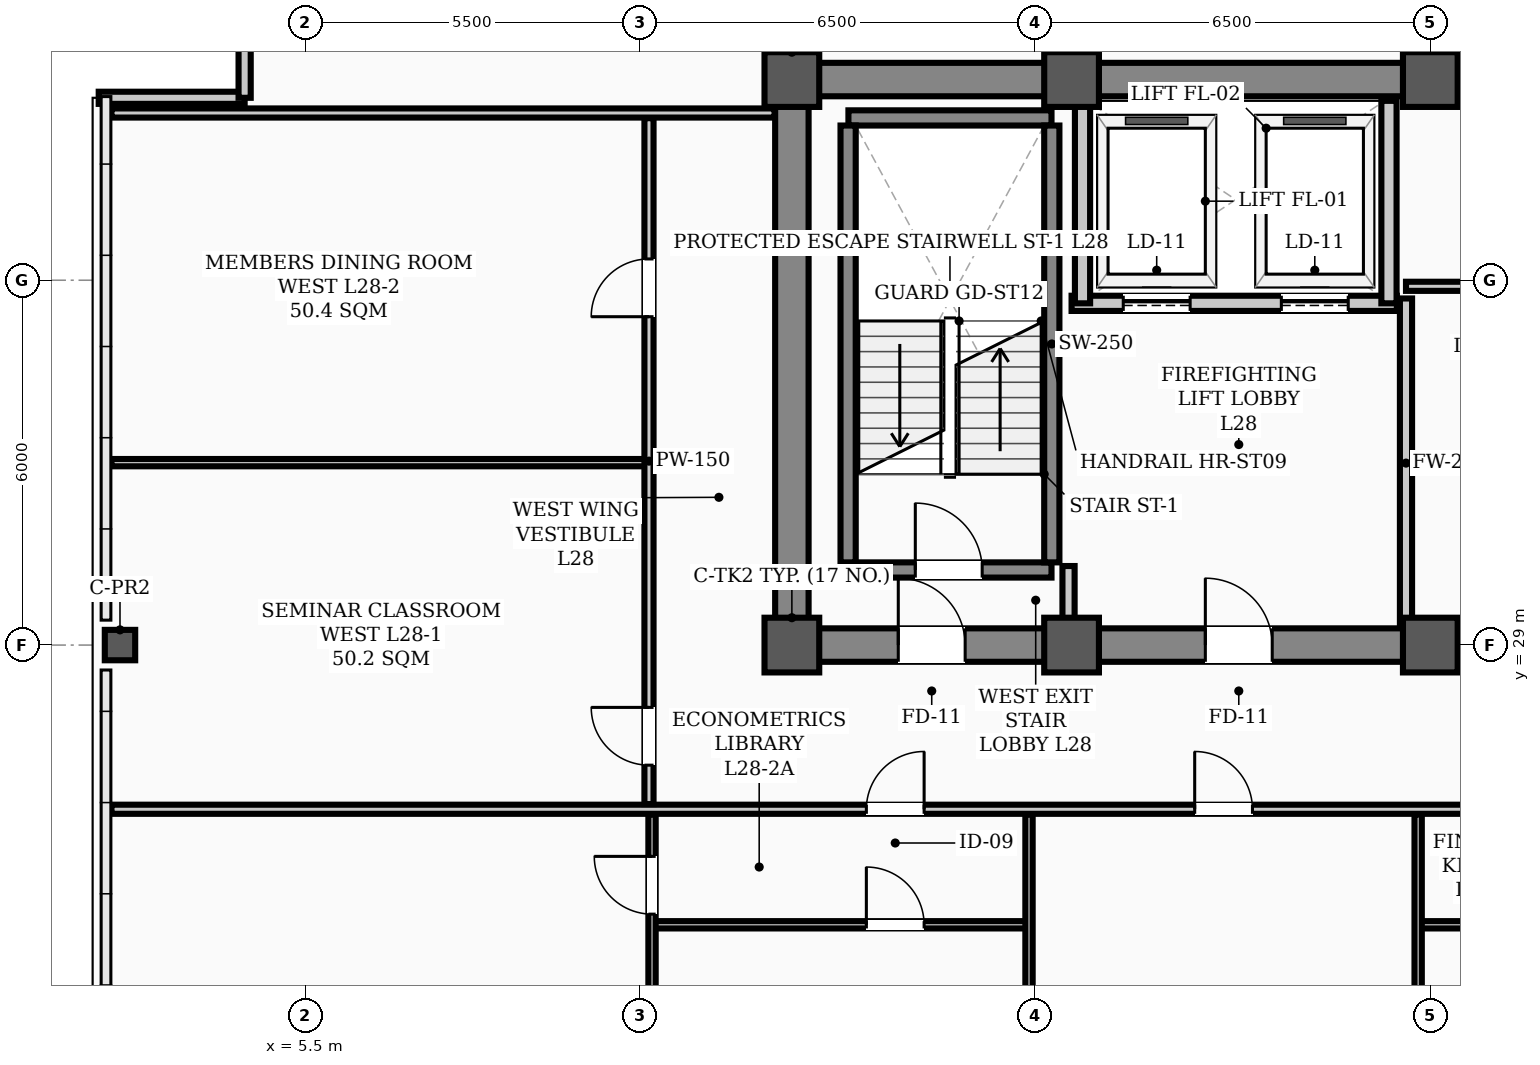
"""IFC4 building model, lengths in metres.
Left out: names, types, materials, properties, quantities, classifications, styles, units other than length and angle.
Written with IfcOpenShell. Run it as: python <this file> out.ifc"""

import sys

from ifc_helpers import new_model, si_unit, direction, frame, frame_2d, origin, origin_2d, place, context, subcontext, project, spatial, rectangle, hollow_rectangle, extrude, element, fill, save


model = new_model("IFC4")
c1 = context("Model", 3, precision=1e-05, world=origin(), true_north=direction((0.0, 1.0)))
c2 = subcontext(c1, "Body", "Model", "MODEL_VIEW")
j1 = project(units=[si_unit("LENGTHUNIT", "METRE"), si_unit("PLANEANGLEUNIT", "RADIAN")], contexts=[c1])
p1 = place(None, origin())
s1 = spatial("IfcSite", under=j1, at=p1, CompositionType="ELEMENT")
p2 = place(p1, origin())
s2 = spatial("IfcBuilding", under=s1, at=p2, CompositionType="ELEMENT")
p3 = place(p2, frame((0.0, 0.0, 114.9)))
s3 = spatial("IfcBuildingStorey", under=s2, at=p3, CompositionType="ELEMENT", Elevation=114.9)
for number, where, z_axis, x_axis in (
    (1, (13.5, 29.0, 0.0), (0.0, 0.0, 1.0), (1.0, 0.0, 0.0)),
    (2, (13.5, 38.3, 0.0), (0.0, 0.0, 1.0), (1.0, 0.0, 0.0)),
    (3, (18.1, 29.0, 0.0), (0.0, 0.0, 1.0), (1.0, 0.0, 0.0)),
    (4, (18.1, 38.3, 0.0), (0.0, 0.0, 1.0), (1.0, 0.0, 0.0)),
    (5, (24.0, 29.0, 0.0), (0.0, 0.0, 1.0), (1.0, 0.0, 0.0)),
    (6, (24.0, 38.3, 0.0), (0.0, 0.0, 1.0), (1.0, 0.0, 0.0)),
):
    element("IfcColumn", number, at=place(p3, frame(where, z_axis=z_axis, x_axis=x_axis)), inside=s3, PredefinedType="COLUMN", context=c2, shape_type="SweptSolid", body=[
        extrude(hollow_rectangle(XDim=0.9, YDim=0.9, WallThickness=0.035, InnerFilletRadius=0.017, OuterFilletRadius=0.052, at=origin_2d()), origin(), (0.0, 0.0, 1.0), 3.9),
    ])
p4 = place(p3, frame((2.45, 29.0, 0.0), z_axis=(0.0, 0.0, 1.0), x_axis=(1.0, 0.0, 0.0)))
e7 = element("IfcColumn", 7, at=p4, inside=s3, PredefinedType="COLUMN", context=c2, shape_type="SweptSolid", body=[
    extrude(hollow_rectangle(XDim=0.5, YDim=0.5, WallThickness=0.024, InnerFilletRadius=0.012, OuterFilletRadius=0.036, at=origin_2d()), origin(), (0.0, 0.0, 1.0), 3.9),
])
for number, where, z_axis, x_axis in (
    (8, (2.1, 38.0, 0.0), (0.0, 0.0, 1.0), (1.0, 0.0, 0.0)),
    (9, (4.5, 38.0, 0.0), (0.0, 0.0, 1.0), (0.0, 1.0, 0.0)),
):
    element("IfcWall", number, at=place(p3, frame(where, z_axis=z_axis, x_axis=x_axis)), inside=s3, PredefinedType="PARAPET", context=c2, shape_type="SweptSolid", body=[
        extrude(rectangle(XDim=2.4, YDim=0.2, at=frame_2d((1.2, 0.0))), origin(), (0.0, 0.0, 1.0), 1.2),
    ])
p5 = place(p3, frame((13.5, 29.0, 0.0), z_axis=(0.0, 0.0, 1.0), x_axis=(1.0, 0.0, 0.0)))
e10 = element("IfcWall", 10, at=p5, inside=s3, PredefinedType="SHEAR", context=c2, shape_type="SweptSolid", body=[
    extrude(rectangle(XDim=30.5, YDim=0.55, at=frame_2d((15.25, 0.0))), origin(), (0.0, 0.0, 1.0), 3.72),
])
p6 = place(p5, frame((1.75, 0.0, 0.0)))
e11 = element("IfcOpeningElement", 11, at=p6, cuts=e10, PredefinedType="OPENING", context=c2, shape_type="SweptSolid", body=[
    extrude(rectangle(XDim=1.1, YDim=2.08, at=frame_2d((0.55, 1.04))), frame((0.0, 0.285, 0.0), z_axis=(0.0, -1.0, 0.0), x_axis=(1.0, 0.0, 0.0)), (0.0, 0.0, 1.0), 0.57),
])
p7 = place(p5, frame((26.7, 0.0, 0.0)))
e12 = element("IfcOpeningElement", 12, at=p7, cuts=e10, PredefinedType="OPENING", context=c2, shape_type="SweptSolid", body=[
    extrude(rectangle(XDim=1.1, YDim=2.08, at=frame_2d((0.55, 1.04))), frame((0.0, 0.285, 0.0), z_axis=(0.0, -1.0, 0.0), x_axis=(1.0, 0.0, 0.0)), (0.0, 0.0, 1.0), 0.57),
])
p8 = place(p5, frame((6.8, 0.0, 0.0)))
e13 = element("IfcOpeningElement", 13, at=p8, cuts=e10, PredefinedType="OPENING", context=c2, shape_type="SweptSolid", body=[
    extrude(rectangle(XDim=1.1, YDim=2.08, at=frame_2d((0.55, 1.04))), frame((0.0, 0.285, 0.0), z_axis=(0.0, -1.0, 0.0), x_axis=(1.0, 0.0, 0.0)), (0.0, 0.0, 1.0), 0.57),
])
p9 = place(p5, frame((13.2, 0.0, 0.0)))
e14 = element("IfcOpeningElement", 14, at=p9, cuts=e10, PredefinedType="OPENING", context=c2, shape_type="SweptSolid", body=[
    extrude(rectangle(XDim=1.6, YDim=2.08, at=frame_2d((0.8, 1.04))), frame((0.0, 0.285, 0.0), z_axis=(0.0, -1.0, 0.0), x_axis=(1.0, 0.0, 0.0)), (0.0, 0.0, 1.0), 0.57),
])
p10 = place(p5, frame((19.53, 0.0, 0.0)))
e15 = element("IfcOpeningElement", 15, at=p10, cuts=e10, PredefinedType="OPENING", context=c2, shape_type="SweptSolid", body=[
    extrude(rectangle(XDim=0.9, YDim=2.08, at=frame_2d((0.45, 1.04))), frame((0.0, 0.285, 0.0), z_axis=(0.0, -1.0, 0.0), x_axis=(1.0, 0.0, 0.0)), (0.0, 0.0, 1.0), 0.57),
])
p11 = place(p5, frame((21.57, 0.0, 0.0)))
e16 = element("IfcOpeningElement", 16, at=p11, cuts=e10, PredefinedType="OPENING", context=c2, shape_type="SweptSolid", body=[
    extrude(rectangle(XDim=0.9, YDim=2.08, at=frame_2d((0.45, 1.04))), frame((0.0, 0.285, 0.0), z_axis=(0.0, -1.0, 0.0), x_axis=(1.0, 0.0, 0.0)), (0.0, 0.0, 1.0), 0.57),
])
p12 = place(p3, frame((13.5, 38.3, 0.0), z_axis=(0.0, 0.0, 1.0), x_axis=(1.0, 0.0, 0.0)))
e17 = element("IfcWall", 17, at=p12, inside=s3, PredefinedType="SHEAR", context=c2, shape_type="SweptSolid", body=[
    extrude(rectangle(XDim=30.5, YDim=0.55, at=frame_2d((15.25, 0.0))), origin(), (0.0, 0.0, 1.0), 3.72),
])
p13 = place(p3, frame((13.5, 29.35, 0.0), z_axis=(0.0, 0.0, 1.0), x_axis=(0.0, 1.0, 0.0)))
e18 = element("IfcWall", 18, at=p13, inside=s3, PredefinedType="SHEAR", context=c2, shape_type="SweptSolid", body=[
    extrude(rectangle(XDim=8.6, YDim=0.55, at=frame_2d((4.3, 0.0))), origin(), (0.0, 0.0, 1.0), 3.72),
])
p14 = place(p3, frame((14.43, 30.235, 0.0), z_axis=(0.0, 0.0, 1.0), x_axis=(1.0, 0.0, 0.0)))
e19 = element("IfcWall", 19, at=p14, inside=s3, PredefinedType="STANDARD", context=c2, shape_type="SweptSolid", body=[
    extrude(rectangle(XDim=3.34, YDim=0.25, at=frame_2d((1.67, 0.0))), origin(), (0.0, 0.0, 1.0), 3.72),
])
p15 = place(p14, frame((1.1, 0.0, 0.0)))
e20 = element("IfcOpeningElement", 20, at=p15, cuts=e19, PredefinedType="OPENING", context=c2, shape_type="SweptSolid", body=[
    extrude(rectangle(XDim=1.1, YDim=2.08, at=frame_2d((0.55, 1.04))), frame((0.0, 0.135, 0.0), z_axis=(0.0, -1.0, 0.0), x_axis=(1.0, 0.0, 0.0)), (0.0, 0.0, 1.0), 0.27),
])
p16 = place(p3, frame((14.43, 37.669, 0.0), z_axis=(0.0, 0.0, 1.0), x_axis=(1.0, 0.0, 0.0)))
e21 = element("IfcWall", 21, at=p16, inside=s3, PredefinedType="STANDARD", context=c2, shape_type="SweptSolid", body=[
    extrude(rectangle(XDim=3.34, YDim=0.25, at=frame_2d((1.67, 0.0))), origin(), (0.0, 0.0, 1.0), 3.72),
])
for number, where, z_axis, x_axis in (
    (22, (14.425, 30.36, 0.0), (0.0, 0.0, 1.0), (0.0, 1.0, 0.0)),
    (23, (17.775, 30.36, 0.0), (0.0, 0.0, 1.0), (0.0, 1.0, 0.0)),
):
    element("IfcWall", number, at=place(p3, frame(where, z_axis=z_axis, x_axis=x_axis)), inside=s3, PredefinedType="STANDARD", context=c2, shape_type="SweptSolid", body=[
        extrude(rectangle(XDim=7.184, YDim=0.25, at=frame_2d((3.592, 0.0))), origin(), (0.0, 0.0, 1.0), 3.72),
    ])
p17 = place(p3, frame((18.1, 34.62, 0.0), z_axis=(0.0, 0.0, 1.0), x_axis=(1.0, 0.0, 0.0)))
e24 = element("IfcWall", 24, at=p17, inside=s3, PredefinedType="STANDARD", context=c2, shape_type="SweptSolid", body=[
    extrude(rectangle(XDim=5.35, YDim=0.25, at=frame_2d((2.675, 0.0))), origin(), (0.0, 0.0, 1.0), 3.72),
])
p18 = place(p17, frame((0.85, 0.0, 0.0)))
e25 = element("IfcOpeningElement", 25, at=p18, cuts=e24, PredefinedType="OPENING", context=c2, shape_type="SweptSolid", body=[
    extrude(rectangle(XDim=1.1, YDim=2.08, at=frame_2d((0.55, 1.04))), frame((0.0, 0.135, 0.0), z_axis=(0.0, -1.0, 0.0), x_axis=(1.0, 0.0, 0.0)), (0.0, 0.0, 1.0), 0.27),
])
p19 = place(p17, frame((3.45, 0.0, 0.0)))
e26 = element("IfcOpeningElement", 26, at=p19, cuts=e24, PredefinedType="OPENING", context=c2, shape_type="SweptSolid", body=[
    extrude(rectangle(XDim=1.1, YDim=2.08, at=frame_2d((0.55, 1.04))), frame((0.0, 0.135, 0.0), z_axis=(0.0, -1.0, 0.0), x_axis=(1.0, 0.0, 0.0)), (0.0, 0.0, 1.0), 0.27),
])
for number, where, z_axis, x_axis in (
    (27, (18.28, 34.62, 0.0), (0.0, 0.0, 1.0), (0.0, 1.0, 0.0)),
    (28, (23.32, 34.62, 0.0), (0.0, 0.0, 1.0), (0.0, 1.0, 0.0)),
):
    element("IfcWall", number, at=place(p3, frame(where, z_axis=z_axis, x_axis=x_axis)), inside=s3, PredefinedType="STANDARD", context=c2, shape_type="SweptSolid", body=[
        extrude(rectangle(XDim=3.33, YDim=0.25, at=frame_2d((1.665, 0.0))), origin(), (0.0, 0.0, 1.0), 3.72),
    ])
p20 = place(p3, frame((23.6, 34.9, 0.0), z_axis=(0.0, 0.0, 1.0), x_axis=(1.0, 0.0, 0.0)))
e29 = element("IfcWall", 29, at=p20, inside=s3, PredefinedType="PARTITIONING", context=c2, shape_type="SweptSolid", body=[
    extrude(rectangle(XDim=4.58, YDim=0.15, at=frame_2d((2.29, 0.0))), origin(), (0.0, 0.0, 1.0), 3.72),
])
p21 = place(p20, frame((1.875, 0.0, 0.0)))
e30 = element("IfcOpeningElement", 30, at=p21, cuts=e29, PredefinedType="OPENING", context=c2, shape_type="SweptSolid", body=[
    extrude(rectangle(XDim=0.95, YDim=2.08, at=frame_2d((0.475, 1.04))), frame((0.0, 0.085, 0.0), z_axis=(0.0, -1.0, 0.0), x_axis=(1.0, 0.0, 0.0)), (0.0, 0.0, 1.0), 0.17),
])
p22 = place(p3, frame((2.31, 26.3, 0.0), z_axis=(0.0, 0.0, 1.0), x_axis=(1.0, 0.0, 0.0)))
e31 = element("IfcWall", 31, at=p22, inside=s3, PredefinedType="PARTITIONING", context=c2, shape_type="SweptSolid", body=[
    extrude(rectangle(XDim=46.38, YDim=0.15, at=frame_2d((23.19, 0.0))), origin(), (0.0, 0.0, 1.0), 3.1),
])
p23 = place(p22, frame((12.415, 0.0, 0.0)))
e32 = element("IfcOpeningElement", 32, at=p23, cuts=e31, PredefinedType="OPENING", context=c2, shape_type="SweptSolid", body=[
    extrude(rectangle(XDim=0.95, YDim=2.08, at=frame_2d((0.475, 1.04))), frame((0.0, 0.085, 0.0), z_axis=(0.0, -1.0, 0.0), x_axis=(1.0, 0.0, 0.0)), (0.0, 0.0, 1.0), 0.17),
])
p24 = place(p22, frame((17.815, 0.0, 0.0)))
e33 = element("IfcOpeningElement", 33, at=p24, cuts=e31, PredefinedType="OPENING", context=c2, shape_type="SweptSolid", body=[
    extrude(rectangle(XDim=0.95, YDim=2.08, at=frame_2d((0.475, 1.04))), frame((0.0, 0.085, 0.0), z_axis=(0.0, -1.0, 0.0), x_axis=(1.0, 0.0, 0.0)), (0.0, 0.0, 1.0), 0.17),
])
p25 = place(p22, frame((24.315, 0.0, 0.0)))
e34 = element("IfcOpeningElement", 34, at=p25, cuts=e31, PredefinedType="OPENING", context=c2, shape_type="SweptSolid", body=[
    extrude(rectangle(XDim=0.95, YDim=2.08, at=frame_2d((0.475, 1.04))), frame((0.0, 0.085, 0.0), z_axis=(0.0, -1.0, 0.0), x_axis=(1.0, 0.0, 0.0)), (0.0, 0.0, 1.0), 0.17),
])
p26 = place(p22, frame((30.915, 0.0, 0.0)))
e35 = element("IfcOpeningElement", 35, at=p26, cuts=e31, PredefinedType="OPENING", context=c2, shape_type="SweptSolid", body=[
    extrude(rectangle(XDim=0.95, YDim=2.08, at=frame_2d((0.475, 1.04))), frame((0.0, 0.085, 0.0), z_axis=(0.0, -1.0, 0.0), x_axis=(1.0, 0.0, 0.0)), (0.0, 0.0, 1.0), 0.17),
])
p27 = place(p22, frame((37.415, 0.0, 0.0)))
e36 = element("IfcOpeningElement", 36, at=p27, cuts=e31, PredefinedType="OPENING", context=c2, shape_type="SweptSolid", body=[
    extrude(rectangle(XDim=0.95, YDim=2.08, at=frame_2d((0.475, 1.04))), frame((0.0, 0.085, 0.0), z_axis=(0.0, -1.0, 0.0), x_axis=(1.0, 0.0, 0.0)), (0.0, 0.0, 1.0), 0.17),
])
p28 = place(p22, frame((43.26, 0.0, 0.0)))
e37 = element("IfcOpeningElement", 37, at=p28, cuts=e31, PredefinedType="OPENING", context=c2, shape_type="SweptSolid", body=[
    extrude(rectangle(XDim=0.95, YDim=2.08, at=frame_2d((0.475, 1.04))), frame((0.0, 0.085, 0.0), z_axis=(0.0, -1.0, 0.0), x_axis=(1.0, 0.0, 0.0)), (0.0, 0.0, 1.0), 0.17),
])
p29 = place(p3, frame((2.31, 37.75, 0.0), z_axis=(0.0, 0.0, 1.0), x_axis=(1.0, 0.0, 0.0)))
e38 = element("IfcWall", 38, at=p29, inside=s3, PredefinedType="PARTITIONING", context=c2, shape_type="SweptSolid", body=[
    extrude(rectangle(XDim=10.905, YDim=0.15, at=frame_2d((5.453, 0.0))), origin(), (0.0, 0.0, 1.0), 3.1),
])
p30 = place(p3, frame((11.2, 24.4, 0.0), z_axis=(0.0, 0.0, 1.0), x_axis=(1.0, 0.0, 0.0)))
e39 = element("IfcWall", 39, at=p30, inside=s3, PredefinedType="PARTITIONING", context=c2, shape_type="SweptSolid", body=[
    extrude(rectangle(XDim=6.2, YDim=0.12, at=frame_2d((3.1, 0.0))), origin(), (0.0, 0.0, 1.0), 3.1),
])
p31 = place(p30, frame((3.525, 0.0, 0.0)))
e40 = element("IfcOpeningElement", 40, at=p31, cuts=e39, PredefinedType="OPENING", context=c2, shape_type="SweptSolid", body=[
    extrude(rectangle(XDim=0.95, YDim=2.08, at=frame_2d((0.475, 1.04))), frame((0.0, 0.07, 0.0), z_axis=(0.0, -1.0, 0.0), x_axis=(1.0, 0.0, 0.0)), (0.0, 0.0, 1.0), 0.14),
])
p32 = place(p3, frame((23.8, 24.4, 0.0), z_axis=(0.0, 0.0, 1.0), x_axis=(1.0, 0.0, 0.0)))
e41 = element("IfcWall", 41, at=p32, inside=s3, PredefinedType="PARTITIONING", context=c2, shape_type="SweptSolid", body=[
    extrude(rectangle(XDim=6.6, YDim=0.12, at=frame_2d((3.3, 0.0))), origin(), (0.0, 0.0, 1.0), 3.1),
])
p33 = place(p32, frame((2.825, 0.0, 0.0)))
e42 = element("IfcOpeningElement", 42, at=p33, cuts=e41, PredefinedType="OPENING", context=c2, shape_type="SweptSolid", body=[
    extrude(rectangle(XDim=0.95, YDim=2.08, at=frame_2d((0.475, 1.04))), frame((0.0, 0.07, 0.0), z_axis=(0.0, -1.0, 0.0), x_axis=(1.0, 0.0, 0.0)), (0.0, 0.0, 1.0), 0.14),
])
p34 = place(p3, frame((2.31, 32.0, 0.0), z_axis=(0.0, 0.0, 1.0), x_axis=(1.0, 0.0, 0.0)))
e43 = element("IfcWall", 43, at=p34, inside=s3, PredefinedType="PARTITIONING", context=c2, shape_type="SweptSolid", body=[
    extrude(rectangle(XDim=8.84, YDim=0.12, at=frame_2d((4.42, 0.0))), origin(), (0.0, 0.0, 1.0), 3.72),
])
p35 = place(p3, frame((18.05, 29.285, 0.0), z_axis=(0.0, 0.0, 1.0), x_axis=(0.0, 1.0, 0.0)))
e44 = element("IfcWall", 44, at=p35, inside=s3, PredefinedType="STANDARD", context=c2, shape_type="SweptSolid", body=[
    extrude(rectangle(XDim=1.015, YDim=0.2, at=frame_2d((0.508, 0.0))), origin(), (0.0, 0.0, 1.0), 3.3),
])
p36 = place(p3, frame((23.6, 29.285, 0.0), z_axis=(0.0, 0.0, 1.0), x_axis=(0.0, 1.0, 0.0)))
e45 = element("IfcWall", 45, at=p36, inside=s3, PredefinedType="STANDARD", context=c2, shape_type="SweptSolid", body=[
    extrude(rectangle(XDim=5.415, YDim=0.2, at=frame_2d((2.708, 0.0))), origin(), (0.0, 0.0, 1.0), 3.1),
])
p37 = place(p3, frame((11.15, 26.385, 0.0), z_axis=(0.0, 0.0, 1.0), x_axis=(0.0, 1.0, 0.0)))
e46 = element("IfcWall", 46, at=p37, inside=s3, PredefinedType="PARTITIONING", context=c2, shape_type="SweptSolid", body=[
    extrude(rectangle(XDim=11.28, YDim=0.15, at=frame_2d((5.64, 0.0))), origin(), (0.0, 0.0, 1.0), 3.0),
])
p38 = place(p37, frame((0.64, 0.0, 0.0)))
e47 = element("IfcOpeningElement", 47, at=p38, cuts=e46, PredefinedType="OPENING", context=c2, shape_type="SweptSolid", body=[
    extrude(rectangle(XDim=0.95, YDim=2.08, at=frame_2d((0.475, 1.04))), frame((0.0, 0.085, 0.0), z_axis=(0.0, -1.0, 0.0), x_axis=(1.0, 0.0, 0.0)), (0.0, 0.0, 1.0), 0.17),
])
p39 = place(p37, frame((8.015, 0.0, 0.0)))
e48 = element("IfcOpeningElement", 48, at=p39, cuts=e46, PredefinedType="OPENING", context=c2, shape_type="SweptSolid", body=[
    extrude(rectangle(XDim=0.95, YDim=2.08, at=frame_2d((0.475, 1.04))), frame((0.0, 0.085, 0.0), z_axis=(0.0, -1.0, 0.0), x_axis=(1.0, 0.0, 0.0)), (0.0, 0.0, 1.0), 0.17),
])
p40 = place(p3, frame((11.2, 10.81, 0.0), z_axis=(0.0, 0.0, 1.0), x_axis=(0.0, 1.0, 0.0)))
e49 = element("IfcWall", 49, at=p40, inside=s3, PredefinedType="PARTITIONING", context=c2, shape_type="SweptSolid", body=[
    extrude(rectangle(XDim=15.405, YDim=0.12, at=frame_2d((7.703, 0.0))), origin(), (0.0, 0.0, 1.0), 3.0),
])
p41 = place(p40, frame((13.765, 0.0, 0.0)))
e50 = element("IfcOpeningElement", 50, at=p41, cuts=e49, PredefinedType="OPENING", context=c2, shape_type="SweptSolid", body=[
    extrude(rectangle(XDim=0.95, YDim=2.08, at=frame_2d((0.475, 1.04))), frame((0.0, 0.07, 0.0), z_axis=(0.0, -1.0, 0.0), x_axis=(1.0, 0.0, 0.0)), (0.0, 0.0, 1.0), 0.14),
])
p42 = place(p3, frame((17.4, 10.81, 0.0), z_axis=(0.0, 0.0, 1.0), x_axis=(0.0, 1.0, 0.0)))
e51 = element("IfcWall", 51, at=p42, inside=s3, PredefinedType="PARTITIONING", context=c2, shape_type="SweptSolid", body=[
    extrude(rectangle(XDim=15.405, YDim=0.12, at=frame_2d((7.703, 0.0))), origin(), (0.0, 0.0, 1.0), 3.0),
])
p43 = place(p3, frame((23.8, 12.57, 0.0), z_axis=(0.0, 0.0, 1.0), x_axis=(0.0, 1.0, 0.0)))
e52 = element("IfcWall", 52, at=p43, inside=s3, PredefinedType="PARTITIONING", context=c2, shape_type="SweptSolid", body=[
    extrude(rectangle(XDim=13.645, YDim=0.12, at=frame_2d((6.823, 0.0))), origin(), (0.0, 0.0, 1.0), 3.0),
])
p44 = place(p15, origin())
e53 = element("IfcDoor", 53, at=p44, inside=s3, OperationType="SINGLE_SWING_LEFT", PredefinedType="DOOR", context=c2, shape_type="SweptSolid", body=[
    extrude(rectangle(XDim=1.1, YDim=2.08, at=frame_2d((0.55, 1.04))), frame((0.0, 0.025, 0.0), z_axis=(0.0, -1.0, 0.0), x_axis=(1.0, 0.0, 0.0)), (0.0, 0.0, 1.0), 0.05),
])
fill(e20, e53)
p45 = place(p6, origin())
e54 = element("IfcDoor", 54, at=p45, inside=s3, OperationType="SINGLE_SWING_LEFT", PredefinedType="DOOR", context=c2, shape_type="SweptSolid", body=[
    extrude(rectangle(XDim=1.1, YDim=2.08, at=frame_2d((0.55, 1.04))), frame((0.0, 0.025, 0.0), z_axis=(0.0, -1.0, 0.0), x_axis=(1.0, 0.0, 0.0)), (0.0, 0.0, 1.0), 0.05),
])
fill(e11, e54)
p46 = place(p8, origin())
e55 = element("IfcDoor", 55, at=p46, inside=s3, OperationType="SINGLE_SWING_LEFT", PredefinedType="DOOR", context=c2, shape_type="SweptSolid", body=[
    extrude(rectangle(XDim=1.1, YDim=2.08, at=frame_2d((0.55, 1.04))), frame((0.0, 0.025, 0.0), z_axis=(0.0, -1.0, 0.0), x_axis=(1.0, 0.0, 0.0)), (0.0, 0.0, 1.0), 0.05),
])
fill(e13, e55)
p47 = place(p41, origin())
e56 = element("IfcDoor", 56, at=p47, inside=s3, OperationType="SINGLE_SWING_RIGHT", PredefinedType="DOOR", context=c2, shape_type="SweptSolid", body=[
    extrude(rectangle(XDim=0.95, YDim=2.08, at=frame_2d((0.475, 1.04))), frame((0.0, 0.025, 0.0), z_axis=(0.0, -1.0, 0.0), x_axis=(1.0, 0.0, 0.0)), (0.0, 0.0, 1.0), 0.05),
])
fill(e50, e56)
p48 = place(p31, origin())
e57 = element("IfcDoor", 57, at=p48, inside=s3, OperationType="SINGLE_SWING_LEFT", PredefinedType="DOOR", context=c2, shape_type="SweptSolid", body=[
    extrude(rectangle(XDim=0.95, YDim=2.08, at=frame_2d((0.475, 1.04))), frame((0.0, 0.025, 0.0), z_axis=(0.0, -1.0, 0.0), x_axis=(1.0, 0.0, 0.0)), (0.0, 0.0, 1.0), 0.05),
])
fill(e40, e57)
p49 = place(p23, origin())
e58 = element("IfcDoor", 58, at=p49, inside=s3, OperationType="SINGLE_SWING_RIGHT", PredefinedType="DOOR", context=c2, shape_type="SweptSolid", body=[
    extrude(rectangle(XDim=0.95, YDim=2.08, at=frame_2d((0.475, 1.04))), frame((0.0, 0.025, 0.0), z_axis=(0.0, -1.0, 0.0), x_axis=(1.0, 0.0, 0.0)), (0.0, 0.0, 1.0), 0.05),
])
fill(e32, e58)
p50 = place(p24, origin())
e59 = element("IfcDoor", 59, at=p50, inside=s3, OperationType="SINGLE_SWING_LEFT", PredefinedType="DOOR", context=c2, shape_type="SweptSolid", body=[
    extrude(rectangle(XDim=0.95, YDim=2.08, at=frame_2d((0.475, 1.04))), frame((0.0, 0.025, 0.0), z_axis=(0.0, -1.0, 0.0), x_axis=(1.0, 0.0, 0.0)), (0.0, 0.0, 1.0), 0.05),
])
fill(e33, e59)
p51 = place(p38, origin())
e60 = element("IfcDoor", 60, at=p51, inside=s3, OperationType="SINGLE_SWING_RIGHT", PredefinedType="DOOR", context=c2, shape_type="SweptSolid", body=[
    extrude(rectangle(XDim=0.95, YDim=2.08, at=frame_2d((0.475, 1.04))), frame((0.0, 0.025, 0.0), z_axis=(0.0, -1.0, 0.0), x_axis=(1.0, 0.0, 0.0)), (0.0, 0.0, 1.0), 0.05),
])
fill(e47, e60)
p52 = place(p39, origin())
e61 = element("IfcDoor", 61, at=p52, inside=s3, OperationType="SINGLE_SWING_LEFT", PredefinedType="DOOR", context=c2, shape_type="SweptSolid", body=[
    extrude(rectangle(XDim=0.95, YDim=2.08, at=frame_2d((0.475, 1.04))), frame((0.0, 0.025, 0.0), z_axis=(0.0, -1.0, 0.0), x_axis=(1.0, 0.0, 0.0)), (0.0, 0.0, 1.0), 0.05),
])
fill(e48, e61)
p53 = place(p18, origin())
e62 = element("IfcDoor", 62, at=p53, inside=s3, OperationType="SLIDING_TO_LEFT", PredefinedType="DOOR", context=c2, shape_type="SweptSolid", body=[
    extrude(rectangle(XDim=1.1, YDim=2.08, at=frame_2d((0.55, 1.04))), frame((0.0, 0.025, 0.0), z_axis=(0.0, -1.0, 0.0), x_axis=(1.0, 0.0, 0.0)), (0.0, 0.0, 1.0), 0.05),
])
fill(e25, e62)
p54 = place(p19, origin())
e63 = element("IfcDoor", 63, at=p54, inside=s3, OperationType="SLIDING_TO_LEFT", PredefinedType="DOOR", context=c2, shape_type="SweptSolid", body=[
    extrude(rectangle(XDim=1.1, YDim=2.08, at=frame_2d((0.55, 1.04))), frame((0.0, 0.025, 0.0), z_axis=(0.0, -1.0, 0.0), x_axis=(1.0, 0.0, 0.0)), (0.0, 0.0, 1.0), 0.05),
])
fill(e26, e63)
save(model, sys.argv[1])
